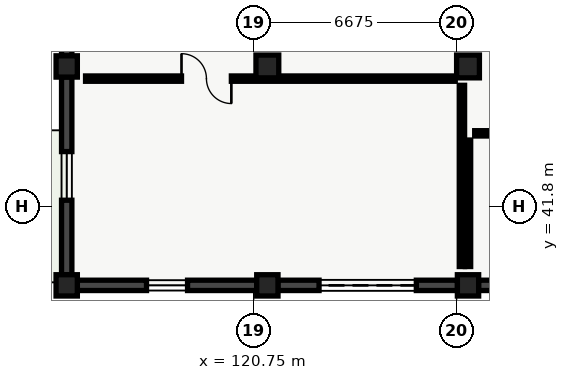
"""IFC4 building model, lengths in metres.
Left out: names, types, materials, properties, quantities, classifications, styles, units other than length and angle.
Written with IfcOpenShell. Run it as: python <this file> out.ifc"""

import sys

from ifc_helpers import new_model, si_unit, direction, frame, frame_2d, origin, origin_2d, place, context, subcontext, project, spatial, rectangle, extrude, element, fill, save


model = new_model("IFC4")
c1 = context("Model", 3, precision=1e-05, world=origin(), true_north=direction((0.0, 1.0)))
c2 = subcontext(c1, "Body", "Model", "MODEL_VIEW")
j1 = project(units=[si_unit("LENGTHUNIT", "METRE"), si_unit("PLANEANGLEUNIT", "RADIAN")], contexts=[c1])
p1 = place(None, origin())
s1 = spatial("IfcSite", under=j1, at=p1, CompositionType="ELEMENT")
p2 = place(p1, origin())
s2 = spatial("IfcBuilding", under=s1, at=p2, CompositionType="ELEMENT")
p3 = place(p2, origin())
s3 = spatial("IfcBuildingStorey", under=s2, at=p3, CompositionType="ELEMENT", Elevation=0.0)
for number, where, z_axis, x_axis in (
    (1, (114.6, 39.2, 0.0), (0.0, 0.0, 1.0), (1.0, 0.0, 0.0)),
    (2, (114.6, 46.4, 0.0), (0.0, 0.0, 1.0), (1.0, 0.0, 0.0)),
    (3, (121.2, 39.2, 0.0), (0.0, 0.0, 1.0), (1.0, 0.0, 0.0)),
):
    element("IfcColumn", number, at=place(p3, frame(where, z_axis=z_axis, x_axis=x_axis)), inside=s3, PredefinedType="COLUMN", context=c2, shape_type="SweptSolid", body=[
        extrude(rectangle(XDim=0.7, YDim=0.7, at=origin_2d()), origin(), (0.0, 0.0, 1.0), 4.9),
    ])
p4 = place(p3, frame((121.2, 46.4, 0.0), z_axis=(0.0, 0.0, 1.0), x_axis=(1.0, 0.0, 0.0)))
e4 = element("IfcColumn", 4, at=p4, inside=s3, PredefinedType="COLUMN", context=c2, shape_type="SweptSolid", body=[
    extrude(rectangle(XDim=0.75, YDim=0.75, at=origin_2d()), origin(), (0.0, 0.0, 1.0), 4.9),
])
p5 = place(p3, frame((127.8, 39.2, 0.0), z_axis=(0.0, 0.0, 1.0), x_axis=(1.0, 0.0, 0.0)))
e5 = element("IfcColumn", 5, at=p5, inside=s3, PredefinedType="COLUMN", context=c2, shape_type="SweptSolid", body=[
    extrude(rectangle(XDim=0.7, YDim=0.7, at=origin_2d()), origin(), (0.0, 0.0, 1.0), 4.9),
])
p6 = place(p3, frame((127.8, 46.4, 0.0), z_axis=(0.0, 0.0, 1.0), x_axis=(1.0, 0.0, 0.0)))
e6 = element("IfcColumn", 6, at=p6, inside=s3, PredefinedType="COLUMN", context=c2, shape_type="SweptSolid", body=[
    extrude(rectangle(XDim=0.75, YDim=0.75, at=origin_2d()), origin(), (0.0, 0.0, 1.0), 4.9),
])
p7 = place(p3, frame((114.6, 39.545, 0.0), z_axis=(0.0, 0.0, 1.0), x_axis=(0.0, 1.0, 0.0)))
e7 = element("IfcWall", 7, at=p7, inside=s3, PredefinedType="SOLIDWALL", context=c2, shape_type="SweptSolid", body=[
    extrude(rectangle(XDim=6.51, YDim=0.34, at=frame_2d((3.255, 0.0))), origin(), (0.0, 0.0, 1.0), 4.435),
])
p8 = place(p7, frame((2.455, 0.0, 0.95)))
e8 = element("IfcOpeningElement", 8, at=p8, cuts=e7, PredefinedType="OPENING", context=c2, shape_type="SweptSolid", body=[
    extrude(rectangle(XDim=1.6, YDim=1.4, at=frame_2d((0.8, 0.7))), frame((0.0, 0.17, 0.0), z_axis=(0.0, -1.0, 0.0), x_axis=(1.0, 0.0, 0.0)), (0.0, 0.0, 1.0), 0.34),
])
p9 = place(p3, frame((114.6, 46.745, 0.0), z_axis=(0.0, 0.0, 1.0), x_axis=(0.0, 1.0, 0.0)))
e9 = element("IfcWall", 9, at=p9, inside=s3, PredefinedType="SOLIDWALL", context=c2, shape_type="SweptSolid", body=[
    extrude(rectangle(XDim=6.51, YDim=0.34, at=frame_2d((3.255, 0.0))), origin(), (0.0, 0.0, 1.0), 4.435),
])
p10 = place(p9, frame((2.58, 0.0, 0.95)))
e10 = element("IfcOpeningElement", 10, at=p10, cuts=e9, PredefinedType="OPENING", context=c2, shape_type="SweptSolid", body=[
    extrude(rectangle(XDim=1.35, YDim=1.8, at=frame_2d((0.675, 0.9))), frame((0.0, 0.17, 0.0), z_axis=(0.0, -1.0, 0.0), x_axis=(1.0, 0.0, 0.0)), (0.0, 0.0, 1.0), 0.34),
])
p11 = place(p3, frame((134.055, 39.2, 0.0), z_axis=(0.0, 0.0, 1.0), x_axis=(-1.0, 0.0, 0.0)))
e11 = element("IfcWall", 11, at=p11, inside=s3, PredefinedType="SOLIDWALL", context=c2, shape_type="SweptSolid", body=[
    extrude(rectangle(XDim=5.91, YDim=0.34, at=frame_2d((2.955, 0.0))), origin(), (0.0, 0.0, 1.0), 4.435),
])
p12 = place(p11, frame((1.255, 0.0, 0.0)))
e12 = element("IfcOpeningElement", 12, at=p12, cuts=e11, PredefinedType="OPENING", context=c2, shape_type="SweptSolid", body=[
    extrude(rectangle(XDim=3.4, YDim=3.1, at=frame_2d((1.7, 1.55))), frame((0.0, 0.17, 0.0), z_axis=(0.0, -1.0, 0.0), x_axis=(1.0, 0.0, 0.0)), (0.0, 0.0, 1.0), 0.34),
])
p13 = place(p3, frame((127.455, 39.2, 0.0), z_axis=(0.0, 0.0, 1.0), x_axis=(-1.0, 0.0, 0.0)))
e13 = element("IfcWall", 13, at=p13, inside=s3, PredefinedType="SOLIDWALL", context=c2, shape_type="SweptSolid", body=[
    extrude(rectangle(XDim=5.91, YDim=0.34, at=frame_2d((2.955, 0.0))), origin(), (0.0, 0.0, 1.0), 4.435),
])
p14 = place(p13, frame((1.355, 0.0, 0.0)))
e14 = element("IfcOpeningElement", 14, at=p14, cuts=e13, PredefinedType="OPENING", context=c2, shape_type="SweptSolid", body=[
    extrude(rectangle(XDim=3.2, YDim=3.0, at=frame_2d((1.6, 1.5))), frame((0.0, 0.17, 0.0), z_axis=(0.0, -1.0, 0.0), x_axis=(1.0, 0.0, 0.0)), (0.0, 0.0, 1.0), 0.34),
])
p15 = place(p3, frame((120.855, 39.2, 0.0), z_axis=(0.0, 0.0, 1.0), x_axis=(-1.0, 0.0, 0.0)))
e15 = element("IfcWall", 15, at=p15, inside=s3, PredefinedType="SOLIDWALL", context=c2, shape_type="SweptSolid", body=[
    extrude(rectangle(XDim=5.91, YDim=0.34, at=frame_2d((2.955, 0.0))), origin(), (0.0, 0.0, 1.0), 4.435),
])
p16 = place(p15, frame((2.28, 0.0, 0.95)))
e16 = element("IfcOpeningElement", 16, at=p16, cuts=e15, PredefinedType="OPENING", context=c2, shape_type="SweptSolid", body=[
    extrude(rectangle(XDim=1.35, YDim=1.8, at=frame_2d((0.675, 0.9))), frame((0.0, 0.17, 0.0), z_axis=(0.0, -1.0, 0.0), x_axis=(1.0, 0.0, 0.0)), (0.0, 0.0, 1.0), 0.34),
])
p17 = place(p3, frame((127.6, 39.82, 0.0), z_axis=(0.0, 0.0, 1.0), x_axis=(0.0, 1.0, 0.0)))
e17 = element("IfcWall", 17, at=p17, inside=s3, PredefinedType="SOLIDWALL", context=c2, shape_type="SweptSolid", body=[
    extrude(rectangle(XDim=5.96, YDim=0.175, at=frame_2d((2.98, 0.0))), origin(), (0.0, 0.0, 1.0), 4.235),
])
p18 = place(p3, frame((127.38, 46.0, 0.0), z_axis=(0.0, 0.0, 1.0), x_axis=(-1.0, 0.0, 0.0)))
e18 = element("IfcWall", 18, at=p18, inside=s3, PredefinedType="SOLIDWALL", context=c2, shape_type="SweptSolid", body=[
    extrude(rectangle(XDim=12.16, YDim=0.175, at=frame_2d((6.08, 0.0))), origin(), (0.0, 0.0, 1.0), 4.55),
])
p19 = place(p18, frame((7.364, 0.0, 0.0)))
e19 = element("IfcOpeningElement", 19, at=p19, cuts=e18, PredefinedType="OPENING", context=c2, shape_type="SweptSolid", body=[
    extrude(rectangle(XDim=1.64, YDim=2.2, at=frame_2d((0.82, 1.1))), frame((0.0, 0.087, 0.0), z_axis=(0.0, -1.0, 0.0), x_axis=(1.0, 0.0, 0.0)), (0.0, 0.0, 1.0), 0.175),
])
p20 = place(p3, frame((140.78, 44.2, 0.0), z_axis=(0.0, 0.0, 1.0), x_axis=(-1.0, 0.0, 0.0)))
e20 = element("IfcWall", 20, at=p20, inside=s3, PredefinedType="SOLIDWALL", context=c2, shape_type="SweptSolid", body=[
    extrude(rectangle(XDim=12.76, YDim=0.175, at=frame_2d((6.38, 0.0))), origin(), (0.0, 0.0, 1.0), 4.485),
])
p21 = place(p20, frame((5.56, 0.0, 0.0)))
e21 = element("IfcOpeningElement", 21, at=p21, cuts=e20, PredefinedType="OPENING", context=c2, shape_type="SweptSolid", body=[
    extrude(rectangle(XDim=1.64, YDim=2.2, at=frame_2d((0.82, 1.1))), frame((0.0, 0.087, 0.0), z_axis=(0.0, -1.0, 0.0), x_axis=(1.0, 0.0, 0.0)), (0.0, 0.0, 1.0), 0.175),
])
p22 = place(p3, frame((127.8, 43.98, 0.0), z_axis=(0.0, 0.0, 1.0), x_axis=(0.0, -1.0, 0.0)))
e22 = element("IfcWall", 22, at=p22, inside=s3, PredefinedType="SOLIDWALL", context=c2, shape_type="SweptSolid", body=[
    extrude(rectangle(XDim=4.16, YDim=0.175, at=frame_2d((2.08, 0.0))), origin(), (0.0, 0.0, 1.0), 4.235),
])
p23 = place(p8, origin())
e23 = element("IfcWindow", 23, at=p23, inside=s3, PartitioningType="SINGLE_PANEL", PredefinedType="WINDOW", context=c2, shape_type="SweptSolid", body=[
    extrude(rectangle(XDim=1.6, YDim=1.4, at=frame_2d((0.8, 0.7))), frame((0.0, 0.03, 0.0), z_axis=(0.0, -1.0, 0.0), x_axis=(1.0, 0.0, 0.0)), (0.0, 0.0, 1.0), 0.06),
])
fill(e8, e23)
p24 = place(p14, origin())
e24 = element("IfcDoor", 24, at=p24, inside=s3, OperationType="ROLLINGUP", PredefinedType="GATE", context=c2, shape_type="SweptSolid", body=[
    extrude(rectangle(XDim=3.2, YDim=3.0, at=frame_2d((1.6, 1.5))), frame((0.0, 0.025, 0.0), z_axis=(0.0, -1.0, 0.0), x_axis=(1.0, 0.0, 0.0)), (0.0, 0.0, 1.0), 0.05),
])
fill(e14, e24)
p25 = place(p16, origin())
e25 = element("IfcWindow", 25, at=p25, inside=s3, PartitioningType="SINGLE_PANEL", PredefinedType="WINDOW", context=c2, shape_type="SweptSolid", body=[
    extrude(rectangle(XDim=1.35, YDim=1.8, at=frame_2d((0.675, 0.9))), frame((0.0, 0.03, 0.0), z_axis=(0.0, -1.0, 0.0), x_axis=(1.0, 0.0, 0.0)), (0.0, 0.0, 1.0), 0.06),
])
fill(e16, e25)
p26 = place(p19, origin())
e26 = element("IfcDoor", 26, at=p26, inside=s3, OperationType="DOUBLE_DOOR_SINGLE_SWING", PredefinedType="DOOR", context=c2, shape_type="SweptSolid", body=[
    extrude(rectangle(XDim=1.64, YDim=2.2, at=frame_2d((0.82, 1.1))), frame((0.0, 0.025, 0.0), z_axis=(0.0, -1.0, 0.0), x_axis=(1.0, 0.0, 0.0)), (0.0, 0.0, 1.0), 0.05),
])
fill(e19, e26)
save(model, sys.argv[1])
